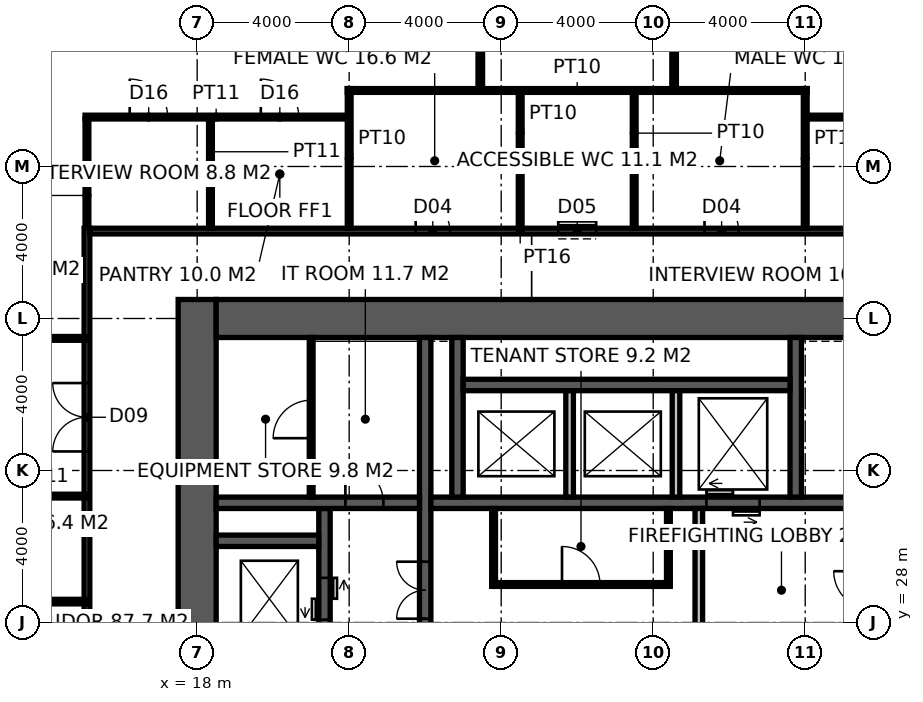
"""IFC4 building model, lengths in metres.
Left out: names, types, materials, properties, quantities, classifications, styles, units other than length and angle.
Written with IfcOpenShell. Run it as: python <this file> out.ifc"""

import sys

from ifc_helpers import new_model, si_unit, direction, frame, frame_2d, origin, place, context, subcontext, project, spatial, rectangle, extrude, element, fill, save


model = new_model("IFC4")
c1 = context("Model", 3, precision=1e-05, world=origin(), true_north=direction((0.0, 1.0)))
c2 = subcontext(c1, "Body", "Model", "MODEL_VIEW")
j1 = project(units=[si_unit("LENGTHUNIT", "METRE"), si_unit("PLANEANGLEUNIT", "RADIAN")], contexts=[c1])
p1 = place(None, origin())
s1 = spatial("IfcSite", under=j1, at=p1, CompositionType="ELEMENT")
p2 = place(p1, origin())
s2 = spatial("IfcBuilding", under=s1, at=p2, CompositionType="ELEMENT")
p3 = place(p2, frame((0.0, 0.0, 105.4)))
s3 = spatial("IfcBuildingStorey", under=s2, at=p3, CompositionType="ELEMENT", Elevation=105.4)
p4 = place(p3, frame((18.0, 17.5, -0.15), z_axis=(0.0, 0.0, 1.0), x_axis=(0.0, 1.0, 0.0)))
e1 = element("IfcWall", 1, at=p4, inside=s3, PredefinedType="SHEAR", context=c2, shape_type="SweptSolid", body=[
    extrude(rectangle(XDim=19.0, YDim=1.0, at=frame_2d((9.5, 0.0))), origin(), (0.0, 0.0, 1.0), 4.0),
])
p5 = place(p3, frame((18.5, 36.0, -0.15), z_axis=(0.0, 0.0, 1.0), x_axis=(1.0, 0.0, 0.0)))
e2 = element("IfcWall", 2, at=p5, inside=s3, PredefinedType="SHEAR", context=c2, shape_type="SweptSolid", body=[
    extrude(rectangle(XDim=17.6, YDim=1.0, at=frame_2d((8.8, 0.0))), origin(), (0.0, 0.0, 1.0), 4.0),
])
p6 = place(p3, frame((24.0, 18.5, -0.15), z_axis=(0.0, 0.0, 1.0), x_axis=(0.0, 1.0, 0.0)))
e3 = element("IfcWall", 3, at=p6, inside=s3, PredefinedType="SHEAR", context=c2, shape_type="SweptSolid", body=[
    extrude(rectangle(XDim=17.0, YDim=0.3, at=frame_2d((8.5, 0.0))), origin(), (0.0, 0.0, 1.0), 4.0),
])
p7 = place(p6, frame((9.6, 0.0, 0.15)))
e4 = element("IfcOpeningElement", 4, at=p7, cuts=e3, PredefinedType="OPENING", context=c2, shape_type="SweptSolid", body=[
    extrude(rectangle(XDim=1.5, YDim=2.4, at=frame_2d((0.75, 1.2))), frame((0.0, 0.16, 0.0), z_axis=(0.0, -1.0, 0.0), x_axis=(1.0, 0.0, 0.0)), (0.0, 0.0, 1.0), 0.32),
])
p8 = place(p3, frame((24.15, 31.15, -0.15), z_axis=(0.0, 0.0, 1.0), x_axis=(1.0, 0.0, 0.0)))
e5 = element("IfcWall", 5, at=p8, inside=s3, PredefinedType="SHEAR", context=c2, shape_type="SweptSolid", body=[
    extrude(rectangle(XDim=11.25, YDim=0.3, at=frame_2d((5.625, 0.0))), origin(), (0.0, 0.0, 1.0), 4.0),
])
p9 = place(p8, frame((7.25, 0.0, 0.15)))
e6 = element("IfcOpeningElement", 6, at=p9, cuts=e5, PredefinedType="OPENING", context=c2, shape_type="SweptSolid", body=[
    extrude(rectangle(XDim=1.4, YDim=2.4, at=frame_2d((0.7, 1.2))), frame((0.0, 0.16, 0.0), z_axis=(0.0, -1.0, 0.0), x_axis=(1.0, 0.0, 0.0)), (0.0, 0.0, 1.0), 0.32),
])
p10 = place(p3, frame((21.35, 18.5, -0.15), z_axis=(0.0, 0.0, 1.0), x_axis=(0.0, 1.0, 0.0)))
e7 = element("IfcWall", 7, at=p10, inside=s3, PredefinedType="SHEAR", context=c2, shape_type="SweptSolid", body=[
    extrude(rectangle(XDim=12.5, YDim=0.3, at=frame_2d((6.25, 0.0))), origin(), (0.0, 0.0, 1.0), 4.0),
])
p11 = place(p10, frame((0.875, 0.0, 0.15)))
e8 = element("IfcOpeningElement", 8, at=p11, cuts=e7, PredefinedType="OPENING", context=c2, shape_type="SweptSolid", body=[
    extrude(rectangle(XDim=1.1, YDim=2.2, at=frame_2d((0.55, 1.1))), frame((0.0, 0.16, 0.0), z_axis=(0.0, -1.0, 0.0), x_axis=(1.0, 0.0, 0.0)), (0.0, 0.0, 1.0), 0.32),
])
p12 = place(p10, frame((3.825, 0.0, 0.15)))
e9 = element("IfcOpeningElement", 9, at=p12, cuts=e7, PredefinedType="OPENING", context=c2, shape_type="SweptSolid", body=[
    extrude(rectangle(XDim=1.1, YDim=2.2, at=frame_2d((0.55, 1.1))), frame((0.0, 0.16, 0.0), z_axis=(0.0, -1.0, 0.0), x_axis=(1.0, 0.0, 0.0)), (0.0, 0.0, 1.0), 0.32),
])
p13 = place(p10, frame((6.675, 0.0, 0.15)))
e10 = element("IfcOpeningElement", 10, at=p13, cuts=e7, PredefinedType="OPENING", context=c2, shape_type="SweptSolid", body=[
    extrude(rectangle(XDim=1.1, YDim=2.2, at=frame_2d((0.55, 1.1))), frame((0.0, 0.16, 0.0), z_axis=(0.0, -1.0, 0.0), x_axis=(1.0, 0.0, 0.0)), (0.0, 0.0, 1.0), 0.32),
])
p14 = place(p10, frame((9.575, 0.0, 0.15)))
e11 = element("IfcOpeningElement", 11, at=p14, cuts=e7, PredefinedType="OPENING", context=c2, shape_type="SweptSolid", body=[
    extrude(rectangle(XDim=1.1, YDim=2.2, at=frame_2d((0.55, 1.1))), frame((0.0, 0.16, 0.0), z_axis=(0.0, -1.0, 0.0), x_axis=(1.0, 0.0, 0.0)), (0.0, 0.0, 1.0), 0.32),
])
p15 = place(p3, frame((18.5, 31.15, -0.15), z_axis=(0.0, 0.0, 1.0), x_axis=(1.0, 0.0, 0.0)))
e12 = element("IfcWall", 12, at=p15, inside=s3, PredefinedType="SHEAR", context=c2, shape_type="SweptSolid", body=[
    extrude(rectangle(XDim=5.35, YDim=0.3, at=frame_2d((2.675, 0.0))), origin(), (0.0, 0.0, 1.0), 4.0),
])
p16 = place(p15, frame((3.4, 0.0, 0.15)))
e13 = element("IfcOpeningElement", 13, at=p16, cuts=e12, PredefinedType="OPENING", context=c2, shape_type="SweptSolid", body=[
    extrude(rectangle(XDim=1.0, YDim=2.2, at=frame_2d((0.5, 1.1))), frame((0.0, 0.16, 0.0), z_axis=(0.0, -1.0, 0.0), x_axis=(1.0, 0.0, 0.0)), (0.0, 0.0, 1.0), 0.32),
])
p17 = place(p3, frame((18.5, 30.15, -0.15), z_axis=(0.0, 0.0, 1.0), x_axis=(1.0, 0.0, 0.0)))
e14 = element("IfcWall", 14, at=p17, inside=s3, PredefinedType="SHEAR", context=c2, shape_type="SweptSolid", body=[
    extrude(rectangle(XDim=2.7, YDim=0.3, at=frame_2d((1.35, 0.0))), origin(), (0.0, 0.0, 1.0), 4.0),
])
for number, where, z_axis, x_axis in (
    (15, (24.85, 31.3, -0.15), (0.0, 0.0, 1.0), (0.0, 1.0, 0.0)),
    (16, (33.75, 31.3, -0.15), (0.0, 0.0, 1.0), (0.0, 1.0, 0.0)),
):
    element("IfcWall", number, at=place(p3, frame(where, z_axis=z_axis, x_axis=x_axis)), inside=s3, PredefinedType="SHEAR", context=c2, shape_type="SweptSolid", body=[
        extrude(rectangle(XDim=4.2, YDim=0.3, at=frame_2d((2.1, 0.0))), origin(), (0.0, 0.0, 1.0), 4.0),
    ])
p18 = place(p3, frame((25.0, 34.25, -0.15), z_axis=(0.0, 0.0, 1.0), x_axis=(1.0, 0.0, 0.0)))
e17 = element("IfcWall", 17, at=p18, inside=s3, PredefinedType="SHEAR", context=c2, shape_type="SweptSolid", body=[
    extrude(rectangle(XDim=8.6, YDim=0.3, at=frame_2d((4.3, 0.0))), origin(), (0.0, 0.0, 1.0), 4.0),
])
for number, where, z_axis, x_axis in (
    (18, (27.8, 31.3, -0.15), (0.0, 0.0, 1.0), (0.0, 1.0, 0.0)),
    (19, (30.6, 31.3, -0.15), (0.0, 0.0, 1.0), (0.0, 1.0, 0.0)),
):
    element("IfcWall", number, at=place(p3, frame(where, z_axis=z_axis, x_axis=x_axis)), inside=s3, PredefinedType="SOLIDWALL", context=c2, shape_type="SweptSolid", body=[
        extrude(rectangle(XDim=2.8, YDim=0.2, at=frame_2d((1.4, 0.0))), origin(), (0.0, 0.0, 1.0), 4.0),
    ])
p19 = place(p3, frame((31.2, 26.7, 0.0), z_axis=(0.0, 0.0, 1.0), x_axis=(0.0, 1.0, 0.0)))
e20 = element("IfcWall", 20, at=p19, inside=s3, PredefinedType="SOLIDWALL", context=c2, shape_type="SweptSolid", body=[
    extrude(rectangle(XDim=4.3, YDim=0.2, at=frame_2d((2.15, 0.0))), origin(), (0.0, 0.0, 1.0), 3.85),
])
p20 = place(p3, frame((21.0, 31.3, 0.0), z_axis=(0.0, 0.0, 1.0), x_axis=(0.0, 1.0, 0.0)))
e21 = element("IfcWall", 21, at=p20, inside=s3, PredefinedType="PARTITIONING", context=c2, shape_type="SweptSolid", body=[
    extrude(rectangle(XDim=4.2, YDim=0.1, at=frame_2d((2.1, 0.0))), origin(), (0.0, 0.0, 1.0), 3.85),
])
p21 = place(p20, frame((1.55, 0.0, 0.0)))
e22 = element("IfcOpeningElement", 22, at=p21, cuts=e21, PredefinedType="OPENING", context=c2, shape_type="SweptSolid", body=[
    extrude(rectangle(XDim=1.0, YDim=2.2, at=frame_2d((0.5, 1.1))), frame((0.0, 0.06, 0.0), z_axis=(0.0, -1.0, 0.0), x_axis=(1.0, 0.0, 0.0)), (0.0, 0.0, 1.0), 0.12),
])
p22 = place(p3, frame((25.75, 29.0, 0.0), z_axis=(0.0, 0.0, 1.0), x_axis=(1.0, 0.0, 0.0)))
e23 = element("IfcWall", 23, at=p22, inside=s3, PredefinedType="PARTITIONING", context=c2, shape_type="SweptSolid", body=[
    extrude(rectangle(XDim=4.7, YDim=0.1, at=frame_2d((2.35, 0.0))), origin(), (0.0, 0.0, 1.0), 3.85),
])
p23 = place(p22, frame((1.85, 0.0, 0.0)))
e24 = element("IfcOpeningElement", 24, at=p23, cuts=e23, PredefinedType="OPENING", context=c2, shape_type="SweptSolid", body=[
    extrude(rectangle(XDim=1.0, YDim=2.2, at=frame_2d((0.5, 1.1))), frame((0.0, 0.06, 0.0), z_axis=(0.0, -1.0, 0.0), x_axis=(1.0, 0.0, 0.0)), (0.0, 0.0, 1.0), 0.12),
])
for number, where, z_axis, x_axis in (
    (25, (25.8, 29.05, 0.0), (0.0, 0.0, 1.0), (0.0, 1.0, 0.0)),
    (26, (30.4, 29.05, 0.0), (0.0, 0.0, 1.0), (0.0, 1.0, 0.0)),
):
    element("IfcWall", number, at=place(p3, frame(where, z_axis=z_axis, x_axis=x_axis)), inside=s3, PredefinedType="PARTITIONING", context=c2, shape_type="SweptSolid", body=[
        extrude(rectangle(XDim=1.95, YDim=0.1, at=frame_2d((0.975, 0.0))), origin(), (0.0, 0.0, 1.0), 3.85),
    ])
p24 = place(p3, frame((15.1, 15.625, 0.0), z_axis=(0.0, 0.0, 1.0), x_axis=(0.0, 1.0, 0.0)))
e27 = element("IfcWall", 27, at=p24, inside=s3, PredefinedType="PARTITIONING", context=c2, shape_type="SweptSolid", body=[
    extrude(rectangle(XDim=22.75, YDim=0.15, at=frame_2d((11.375, 0.0))), origin(), (0.0, 0.0, 1.0), 3.85),
])
p25 = place(p24, frame((3.074, 0.0, 0.0)))
e28 = element("IfcOpeningElement", 28, at=p25, cuts=e27, PredefinedType="OPENING", context=c2, shape_type="SweptSolid", body=[
    extrude(rectangle(XDim=1.8, YDim=2.4, at=frame_2d((0.9, 1.2))), frame((0.0, 0.085, 0.0), z_axis=(0.0, -1.0, 0.0), x_axis=(1.0, 0.0, 0.0)), (0.0, 0.0, 1.0), 0.17),
])
p26 = place(p24, frame((16.876, 0.0, 0.0)))
e29 = element("IfcOpeningElement", 29, at=p26, cuts=e27, PredefinedType="OPENING", context=c2, shape_type="SweptSolid", body=[
    extrude(rectangle(XDim=1.8, YDim=2.4, at=frame_2d((0.9, 1.2))), frame((0.0, 0.085, 0.0), z_axis=(0.0, -1.0, 0.0), x_axis=(1.0, 0.0, 0.0)), (0.0, 0.0, 1.0), 0.17),
])
p27 = place(p24, frame((9.875, 0.0, 0.0)))
e30 = element("IfcOpeningElement", 30, at=p27, cuts=e27, PredefinedType="OPENING", context=c2, shape_type="SweptSolid", body=[
    extrude(rectangle(XDim=1.0, YDim=2.2, at=frame_2d((0.5, 1.1))), frame((0.0, 0.085, 0.0), z_axis=(0.0, -1.0, 0.0), x_axis=(1.0, 0.0, 0.0)), (0.0, 0.0, 1.0), 0.17),
])
p28 = place(p3, frame((15.175, 38.3, 0.0), z_axis=(0.0, 0.0, 1.0), x_axis=(1.0, 0.0, 0.0)))
e31 = element("IfcWall", 31, at=p28, inside=s3, PredefinedType="PARTITIONING", context=c2, shape_type="SweptSolid", body=[
    extrude(rectangle(XDim=22.65, YDim=0.15, at=frame_2d((11.325, 0.0))), origin(), (0.0, 0.0, 1.0), 3.85),
])
p29 = place(p28, frame((8.575, 0.0, 0.0)))
e32 = element("IfcOpeningElement", 32, at=p29, cuts=e31, PredefinedType="OPENING", context=c2, shape_type="SweptSolid", body=[
    extrude(rectangle(XDim=0.9, YDim=2.1, at=frame_2d((0.45, 1.05))), frame((0.0, 0.085, 0.0), z_axis=(0.0, -1.0, 0.0), x_axis=(1.0, 0.0, 0.0)), (0.0, 0.0, 1.0), 0.17),
])
p30 = place(p28, frame((12.325, 0.0, 0.0)))
e33 = element("IfcOpeningElement", 33, at=p30, cuts=e31, PredefinedType="OPENING", context=c2, shape_type="SweptSolid", body=[
    extrude(rectangle(XDim=1.0, YDim=2.1, at=frame_2d((0.5, 1.05))), frame((0.0, 0.085, 0.0), z_axis=(0.0, -1.0, 0.0), x_axis=(1.0, 0.0, 0.0)), (0.0, 0.0, 1.0), 0.17),
])
p31 = place(p28, frame((16.175, 0.0, 0.0)))
e34 = element("IfcOpeningElement", 34, at=p31, cuts=e31, PredefinedType="OPENING", context=c2, shape_type="SweptSolid", body=[
    extrude(rectangle(XDim=0.9, YDim=2.1, at=frame_2d((0.45, 1.05))), frame((0.0, 0.085, 0.0), z_axis=(0.0, -1.0, 0.0), x_axis=(1.0, 0.0, 0.0)), (0.0, 0.0, 1.0), 0.17),
])
for number, where, z_axis, x_axis in (
    (35, (22.0, 38.375, 0.0), (0.0, 0.0, 1.0), (0.0, 1.0, 0.0)),
    (36, (34.0, 38.375, 0.0), (0.0, 0.0, 1.0), (0.0, 1.0, 0.0)),
):
    element("IfcWall", number, at=place(p3, frame(where, z_axis=z_axis, x_axis=x_axis)), inside=s3, PredefinedType="PARTITIONING", context=c2, shape_type="SweptSolid", body=[
        extrude(rectangle(XDim=3.675, YDim=0.1, at=frame_2d((1.837, 0.0))), origin(), (0.0, 0.0, 1.0), 2.95),
    ])
p32 = place(p3, frame((21.95, 42.0, 0.0), z_axis=(0.0, 0.0, 1.0), x_axis=(1.0, 0.0, 0.0)))
e37 = element("IfcWall", 37, at=p32, inside=s3, PredefinedType="PARTITIONING", context=c2, shape_type="SweptSolid", body=[
    extrude(rectangle(XDim=12.1, YDim=0.1, at=frame_2d((6.05, 0.0))), origin(), (0.0, 0.0, 1.0), 3.85),
])
for number, where, z_axis, x_axis in (
    (38, (26.5, 38.375, 0.0), (0.0, 0.0, 1.0), (0.0, 1.0, 0.0)),
    (39, (29.5, 38.375, 0.0), (0.0, 0.0, 1.0), (0.0, 1.0, 0.0)),
):
    element("IfcWall", number, at=place(p3, frame(where, z_axis=z_axis, x_axis=x_axis)), inside=s3, PredefinedType="PARTITIONING", context=c2, shape_type="SweptSolid", body=[
        extrude(rectangle(XDim=3.575, YDim=0.1, at=frame_2d((1.788, 0.0))), origin(), (0.0, 0.0, 1.0), 3.85),
    ])
p33 = place(p3, frame((10.68, 28.55, 0.0), z_axis=(0.0, 0.0, 1.0), x_axis=(1.0, 0.0, 0.0)))
e40 = element("IfcWall", 40, at=p33, inside=s3, PredefinedType="PARTITIONING", context=c2, shape_type="SweptSolid", body=[
    extrude(rectangle(XDim=4.42, YDim=0.12, at=frame_2d((2.21, 0.0))), origin(), (0.0, 0.0, 1.0), 2.65),
])
for number, where, z_axis, x_axis in (
    (41, (25.45, 42.0, 0.0), (0.0, 0.0, 1.0), (0.0, 1.0, 0.0)),
    (42, (30.55, 42.0, 0.0), (0.0, 0.0, 1.0), (0.0, 1.0, 0.0)),
):
    element("IfcWall", number, at=place(p3, frame(where, z_axis=z_axis, x_axis=x_axis)), inside=s3, PredefinedType="PARTITIONING", context=c2, shape_type="SweptSolid", body=[
        extrude(rectangle(XDim=9.32, YDim=0.12, at=frame_2d((4.66, 0.0))), origin(), (0.0, 0.0, 1.0), 3.85),
    ])
p34 = place(p3, frame((15.05, 41.3, 0.0), z_axis=(0.0, 0.0, 1.0), x_axis=(1.0, 0.0, 0.0)))
e43 = element("IfcWall", 43, at=p34, inside=s3, PredefinedType="PARTITIONING", context=c2, shape_type="SweptSolid", body=[
    extrude(rectangle(XDim=6.9, YDim=0.1, at=frame_2d((3.45, 0.0))), origin(), (0.0, 0.0, 1.0), 3.85),
])
p35 = place(p34, frame((1.175, 0.0, 0.0)))
e44 = element("IfcOpeningElement", 44, at=p35, cuts=e43, PredefinedType="OPENING", context=c2, shape_type="SweptSolid", body=[
    extrude(rectangle(XDim=1.0, YDim=2.2, at=frame_2d((0.5, 1.1))), frame((0.0, 0.06, 0.0), z_axis=(0.0, -1.0, 0.0), x_axis=(1.0, 0.0, 0.0)), (0.0, 0.0, 1.0), 0.12),
])
p36 = place(p34, frame((4.625, 0.0, 0.0)))
e45 = element("IfcOpeningElement", 45, at=p36, cuts=e43, PredefinedType="OPENING", context=c2, shape_type="SweptSolid", body=[
    extrude(rectangle(XDim=1.0, YDim=2.2, at=frame_2d((0.5, 1.1))), frame((0.0, 0.06, 0.0), z_axis=(0.0, -1.0, 0.0), x_axis=(1.0, 0.0, 0.0)), (0.0, 0.0, 1.0), 0.12),
])
p37 = place(p3, frame((34.05, 41.3, 0.0), z_axis=(0.0, 0.0, 1.0), x_axis=(1.0, 0.0, 0.0)))
e46 = element("IfcWall", 46, at=p37, inside=s3, PredefinedType="PARTITIONING", context=c2, shape_type="SweptSolid", body=[
    extrude(rectangle(XDim=3.9, YDim=0.1, at=frame_2d((1.95, 0.0))), origin(), (0.0, 0.0, 1.0), 3.85),
])
p38 = place(p37, frame((1.4, 0.0, 0.0)))
e47 = element("IfcOpeningElement", 47, at=p38, cuts=e46, PredefinedType="OPENING", context=c2, shape_type="SweptSolid", body=[
    extrude(rectangle(XDim=1.0, YDim=2.2, at=frame_2d((0.5, 1.1))), frame((0.0, 0.06, 0.0), z_axis=(0.0, -1.0, 0.0), x_axis=(1.0, 0.0, 0.0)), (0.0, 0.0, 1.0), 0.12),
])
p39 = place(p3, frame((15.1, 38.375, 0.0), z_axis=(0.0, 0.0, 1.0), x_axis=(0.0, 1.0, 0.0)))
e48 = element("IfcWall", 48, at=p39, inside=s3, PredefinedType="PARTITIONING", context=c2, shape_type="SweptSolid", body=[
    extrude(rectangle(XDim=2.875, YDim=0.1, at=frame_2d((1.438, 0.0))), origin(), (0.0, 0.0, 1.0), 3.85),
])
p40 = place(p3, frame((18.35, 38.375, 0.0), z_axis=(0.0, 0.0, 1.0), x_axis=(0.0, 1.0, 0.0)))
e49 = element("IfcWall", 49, at=p40, inside=s3, PredefinedType="PARTITIONING", context=c2, shape_type="SweptSolid", body=[
    extrude(rectangle(XDim=2.875, YDim=0.1, at=frame_2d((1.438, 0.0))), origin(), (0.0, 0.0, 1.0), 2.65),
])
for number, where, z_axis, x_axis in (
    (50, (15.1, 35.476, 0.0), (0.0, 0.0, 1.0), (-1.0, 0.0, 0.0)),
    (51, (11.15, 31.326, 0.0), (0.0, 0.0, 1.0), (1.0, 0.0, 0.0)),
):
    element("IfcWall", number, at=place(p3, frame(where, z_axis=z_axis, x_axis=x_axis)), inside=s3, PredefinedType="PARTITIONING", context=c2, shape_type="SweptSolid", body=[
        extrude(rectangle(XDim=3.95, YDim=0.1, at=frame_2d((1.975, 0.0))), origin(), (0.0, 0.0, 1.0), 3.85),
    ])
p41 = place(p7, origin())
e52 = element("IfcDoor", 52, at=p41, inside=s3, OperationType="DOUBLE_DOOR_DOUBLE_SWING", PredefinedType="DOOR", context=c2, shape_type="SweptSolid", body=[
    extrude(rectangle(XDim=1.5, YDim=2.4, at=frame_2d((0.75, 1.2))), frame((0.0, 0.025, 0.0), z_axis=(0.0, -1.0, 0.0), x_axis=(1.0, 0.0, 0.0)), (0.0, 0.0, 1.0), 0.05),
])
fill(e4, e52)
p42 = place(p16, origin())
e53 = element("IfcDoor", 53, at=p42, inside=s3, OperationType="SINGLE_SWING_LEFT", PredefinedType="DOOR", context=c2, shape_type="SweptSolid", body=[
    extrude(rectangle(XDim=1.0, YDim=2.2, at=frame_2d((0.5, 1.1))), frame((0.0, 0.025, 0.0), z_axis=(0.0, -1.0, 0.0), x_axis=(1.0, 0.0, 0.0)), (0.0, 0.0, 1.0), 0.05),
])
fill(e13, e53)
p43 = place(p21, origin())
e54 = element("IfcDoor", 54, at=p43, inside=s3, OperationType="SINGLE_SWING_LEFT", PredefinedType="DOOR", context=c2, shape_type="SweptSolid", body=[
    extrude(rectangle(XDim=1.0, YDim=2.2, at=frame_2d((0.5, 1.1))), frame((0.0, 0.025, 0.0), z_axis=(0.0, -1.0, 0.0), x_axis=(1.0, 0.0, 0.0)), (0.0, 0.0, 1.0), 0.05),
])
fill(e22, e54)
p44 = place(p23, origin())
e55 = element("IfcDoor", 55, at=p44, inside=s3, OperationType="SINGLE_SWING_LEFT", PredefinedType="DOOR", context=c2, shape_type="SweptSolid", body=[
    extrude(rectangle(XDim=1.0, YDim=2.2, at=frame_2d((0.5, 1.1))), frame((0.0, 0.025, 0.0), z_axis=(0.0, -1.0, 0.0), x_axis=(1.0, 0.0, 0.0)), (0.0, 0.0, 1.0), 0.05),
])
fill(e24, e55)
p45 = place(p29, origin())
e56 = element("IfcDoor", 56, at=p45, inside=s3, OperationType="SINGLE_SWING_LEFT", PredefinedType="DOOR", context=c2, shape_type="SweptSolid", body=[
    extrude(rectangle(XDim=0.9, YDim=2.1, at=frame_2d((0.45, 1.05))), frame((0.0, 0.025, 0.0), z_axis=(0.0, -1.0, 0.0), x_axis=(1.0, 0.0, 0.0)), (0.0, 0.0, 1.0), 0.05),
])
fill(e32, e56)
p46 = place(p30, origin())
e57 = element("IfcDoor", 57, at=p46, inside=s3, OperationType="SLIDING_TO_LEFT", PredefinedType="DOOR", context=c2, shape_type="SweptSolid", body=[
    extrude(rectangle(XDim=1.0, YDim=2.1, at=frame_2d((0.5, 1.05))), frame((0.0, 0.025, 0.0), z_axis=(0.0, -1.0, 0.0), x_axis=(1.0, 0.0, 0.0)), (0.0, 0.0, 1.0), 0.05),
])
fill(e33, e57)
p47 = place(p31, origin())
e58 = element("IfcDoor", 58, at=p47, inside=s3, OperationType="SINGLE_SWING_LEFT", PredefinedType="DOOR", context=c2, shape_type="SweptSolid", body=[
    extrude(rectangle(XDim=0.9, YDim=2.1, at=frame_2d((0.45, 1.05))), frame((0.0, 0.025, 0.0), z_axis=(0.0, -1.0, 0.0), x_axis=(1.0, 0.0, 0.0)), (0.0, 0.0, 1.0), 0.05),
])
fill(e34, e58)
p48 = place(p26, origin())
e59 = element("IfcDoor", 59, at=p48, inside=s3, OperationType="DOUBLE_DOOR_DOUBLE_SWING", PredefinedType="DOOR", context=c2, shape_type="SweptSolid", body=[
    extrude(rectangle(XDim=1.8, YDim=2.4, at=frame_2d((0.9, 1.2))), frame((0.0, 0.025, 0.0), z_axis=(0.0, -1.0, 0.0), x_axis=(1.0, 0.0, 0.0)), (0.0, 0.0, 1.0), 0.05),
])
fill(e29, e59)
p49 = place(p35, origin())
e60 = element("IfcDoor", 60, at=p49, inside=s3, OperationType="SINGLE_SWING_LEFT", PredefinedType="DOOR", context=c2, shape_type="SweptSolid", body=[
    extrude(rectangle(XDim=1.0, YDim=2.2, at=frame_2d((0.5, 1.1))), frame((0.0, 0.025, 0.0), z_axis=(0.0, -1.0, 0.0), x_axis=(1.0, 0.0, 0.0)), (0.0, 0.0, 1.0), 0.05),
])
fill(e44, e60)
p50 = place(p36, origin())
e61 = element("IfcDoor", 61, at=p50, inside=s3, OperationType="SINGLE_SWING_LEFT", PredefinedType="DOOR", context=c2, shape_type="SweptSolid", body=[
    extrude(rectangle(XDim=1.0, YDim=2.2, at=frame_2d((0.5, 1.1))), frame((0.0, 0.025, 0.0), z_axis=(0.0, -1.0, 0.0), x_axis=(1.0, 0.0, 0.0)), (0.0, 0.0, 1.0), 0.05),
])
fill(e45, e61)
p51 = place(p9, origin())
e62 = element("IfcDoor", 62, at=p51, inside=s3, OperationType="DOUBLE_DOOR_SLIDING", PredefinedType="DOOR", context=c2, shape_type="SweptSolid", body=[
    extrude(rectangle(XDim=1.4, YDim=2.4, at=frame_2d((0.7, 1.2))), frame((0.0, 0.025, 0.0), z_axis=(0.0, -1.0, 0.0), x_axis=(1.0, 0.0, 0.0)), (0.0, 0.0, 1.0), 0.05),
])
fill(e6, e62)
p52 = place(p14, origin())
e63 = element("IfcDoor", 63, at=p52, inside=s3, OperationType="DOUBLE_DOOR_SLIDING", PredefinedType="DOOR", context=c2, shape_type="SweptSolid", body=[
    extrude(rectangle(XDim=1.1, YDim=2.2, at=frame_2d((0.55, 1.1))), frame((0.0, 0.025, 0.0), z_axis=(0.0, -1.0, 0.0), x_axis=(1.0, 0.0, 0.0)), (0.0, 0.0, 1.0), 0.05),
])
fill(e11, e63)
save(model, sys.argv[1])
